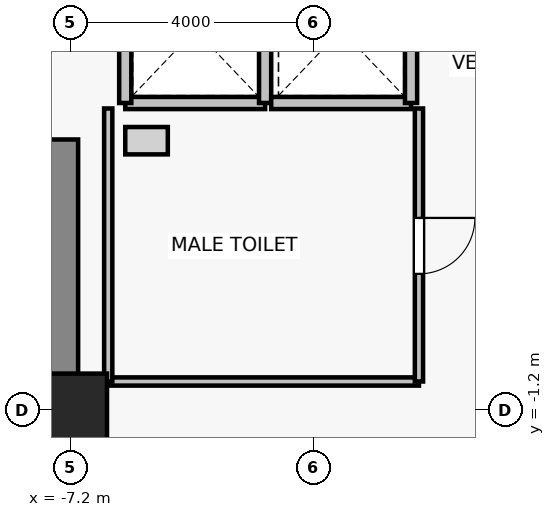
"""IFC4 building model, lengths in metres.
Left out: names, types, materials, properties, quantities, classifications, styles, units other than length and angle.
Written with IfcOpenShell. Run it as: python <this file> out.ifc"""

import sys

from ifc_helpers import new_model, si_unit, direction, frame, frame_2d, origin, origin_2d, place, context, subcontext, project, spatial, rectangle, extrude, source, transform, mapped, element, fill, save


model = new_model("IFC4")
c1 = context("Model", 3, precision=1e-05, world=origin(), true_north=direction((0.0, 1.0)))
c2 = subcontext(c1, "Body", "Model", "MODEL_VIEW")
j1 = project(units=[si_unit("LENGTHUNIT", "METRE"), si_unit("PLANEANGLEUNIT", "RADIAN")], contexts=[c1])
p1 = place(None, origin())
s1 = spatial("IfcSite", under=j1, at=p1, CompositionType="ELEMENT")
p2 = place(p1, origin())
s2 = spatial("IfcBuilding", under=s1, at=p2, CompositionType="ELEMENT")
p3 = place(p2, frame((0.0, 0.0, 60.4)))
s3 = spatial("IfcBuildingStorey", under=s2, at=p3, CompositionType="ELEMENT", Elevation=60.4)
p4 = place(p3, frame((-7.2, -1.2, 0.0), z_axis=(0.0, 0.0, 1.0), x_axis=(1.0, 0.0, 0.0)))
e1 = element("IfcColumn", 1, at=p4, inside=s3, PredefinedType="COLUMN", context=c2, shape_type="SweptSolid", body=[
    extrude(rectangle(XDim=1.2, YDim=1.2, at=origin_2d()), origin(), (0.0, 0.0, 1.0), 3.3),
])
p5 = place(p3, frame((-7.4, -0.75, 0.0), z_axis=(0.0, 0.0, 1.0), x_axis=(0.0, 1.0, 0.0)))
e2 = element("IfcWall", 2, at=p5, inside=s3, PredefinedType="SHEAR", context=c2, shape_type="SweptSolid", body=[
    extrude(rectangle(XDim=4.0, YDim=0.65, at=frame_2d((2.0, 0.0))), origin(), (0.0, 0.0, 1.0), 3.075),
])
p6 = place(p3, frame((-4.0, 3.85, 0.0), z_axis=(0.0, 0.0, 1.0), x_axis=(-1.0, 0.0, 0.0)))
e3 = element("IfcWall", 3, at=p6, inside=s3, PredefinedType="SOLIDWALL", context=c2, shape_type="SweptSolid", body=[
    extrude(rectangle(XDim=2.3, YDim=0.2, at=frame_2d((1.15, 0.0))), origin(), (0.0, 0.0, 1.0), 3.075),
])
for number, where, z_axis, x_axis in (
    (4, (-6.3, 3.85, 0.0), (0.0, 0.0, 1.0), (0.0, 1.0, 0.0)),
    (5, (-4.0, 6.25, 0.0), (0.0, 0.0, 1.0), (0.0, -1.0, 0.0)),
):
    element("IfcWall", number, at=place(p3, frame(where, z_axis=z_axis, x_axis=x_axis)), inside=s3, PredefinedType="SOLIDWALL", context=c2, shape_type="SweptSolid", body=[
        extrude(rectangle(XDim=2.4, YDim=0.2, at=frame_2d((1.2, 0.0))), origin(), (0.0, 0.0, 1.0), 3.075),
    ])
p7 = place(p3, frame((-1.6, 3.85, 0.0), z_axis=(0.0, 0.0, 1.0), x_axis=(-1.0, 0.0, 0.0)))
e6 = element("IfcWall", 6, at=p7, inside=s3, PredefinedType="SOLIDWALL", context=c2, shape_type="SweptSolid", body=[
    extrude(rectangle(XDim=2.3, YDim=0.2, at=frame_2d((1.15, 0.0))), origin(), (0.0, 0.0, 1.0), 3.075),
])
p8 = place(p3, frame((-1.6, 6.25, 0.0), z_axis=(0.0, 0.0, 1.0), x_axis=(0.0, -1.0, 0.0)))
e7 = element("IfcWall", 7, at=p8, inside=s3, PredefinedType="SOLIDWALL", context=c2, shape_type="SweptSolid", body=[
    extrude(rectangle(XDim=2.4, YDim=0.2, at=frame_2d((1.2, 0.0))), origin(), (0.0, 0.0, 1.0), 3.075),
])
p9 = place(p3, frame((-1.47, -0.73, 0.0), z_axis=(0.0, 0.0, 1.0), x_axis=(-1.0, 0.0, 0.0)))
e8 = element("IfcWall", 8, at=p9, inside=s3, PredefinedType="PARTITIONING", context=c2, shape_type="SweptSolid", body=[
    extrude(rectangle(XDim=5.11, YDim=0.135, at=frame_2d((2.555, 0.0))), origin(), (0.0, 0.0, 1.0), 3.075),
])
p10 = place(p3, frame((-6.58, -0.73, 0.0), z_axis=(0.0, 0.0, 1.0), x_axis=(0.0, 1.0, 0.0)))
e9 = element("IfcWall", 9, at=p10, inside=s3, PredefinedType="PARTITIONING", context=c2, shape_type="SweptSolid", body=[
    extrude(rectangle(XDim=4.49, YDim=0.135, at=frame_2d((2.245, 0.0))), origin(), (0.0, 0.0, 1.0), 3.075),
])
p11 = place(p3, frame((-1.47, 3.76, 0.0), z_axis=(0.0, 0.0, 1.0), x_axis=(0.0, -1.0, 0.0)))
e10 = element("IfcWall", 10, at=p11, inside=s3, PredefinedType="PARTITIONING", context=c2, shape_type="SweptSolid", body=[
    extrude(rectangle(XDim=4.49, YDim=0.135, at=frame_2d((2.245, 0.0))), origin(), (0.0, 0.0, 1.0), 3.075),
])
p12 = place(p11, frame((1.8, 0.0, 0.0)))
e11 = element("IfcOpeningElement", 11, at=p12, cuts=e10, PredefinedType="OPENING", context=c2, shape_type="SweptSolid", body=[
    extrude(rectangle(XDim=0.92, YDim=2.1, at=frame_2d((0.46, 1.05))), frame((0.0, 0.077, 0.0), z_axis=(0.0, -1.0, 0.0), x_axis=(1.0, 0.0, 0.0)), (0.0, 0.0, 1.0), 0.155),
])
m1 = source(origin(), c2, "Body", "SweptSolid", [
    extrude(rectangle(XDim=0.92, YDim=2.1, at=frame_2d((0.46, 1.05))), frame((0.0, 0.025, 0.0), z_axis=(0.0, -1.0, 0.0), x_axis=(1.0, 0.0, 0.0)), (0.0, 0.0, 1.0), 0.05),
])
p13 = place(p12, origin())
e12 = element("IfcDoor", 12, at=p13, inside=s3, OperationType="SINGLE_SWING_LEFT", PredefinedType="DOOR", context=c2, shape_type="MappedRepresentation", body=[
    mapped(m1, transform((0.0, 0.0, 0.0), x_axis=(1.0, 0.0, 0.0), y_axis=(0.0, 1.0, 0.0), z_axis=(0.0, 0.0, 1.0), scale=1.0)),
])
fill(e11, e12)
save(model, sys.argv[1])
